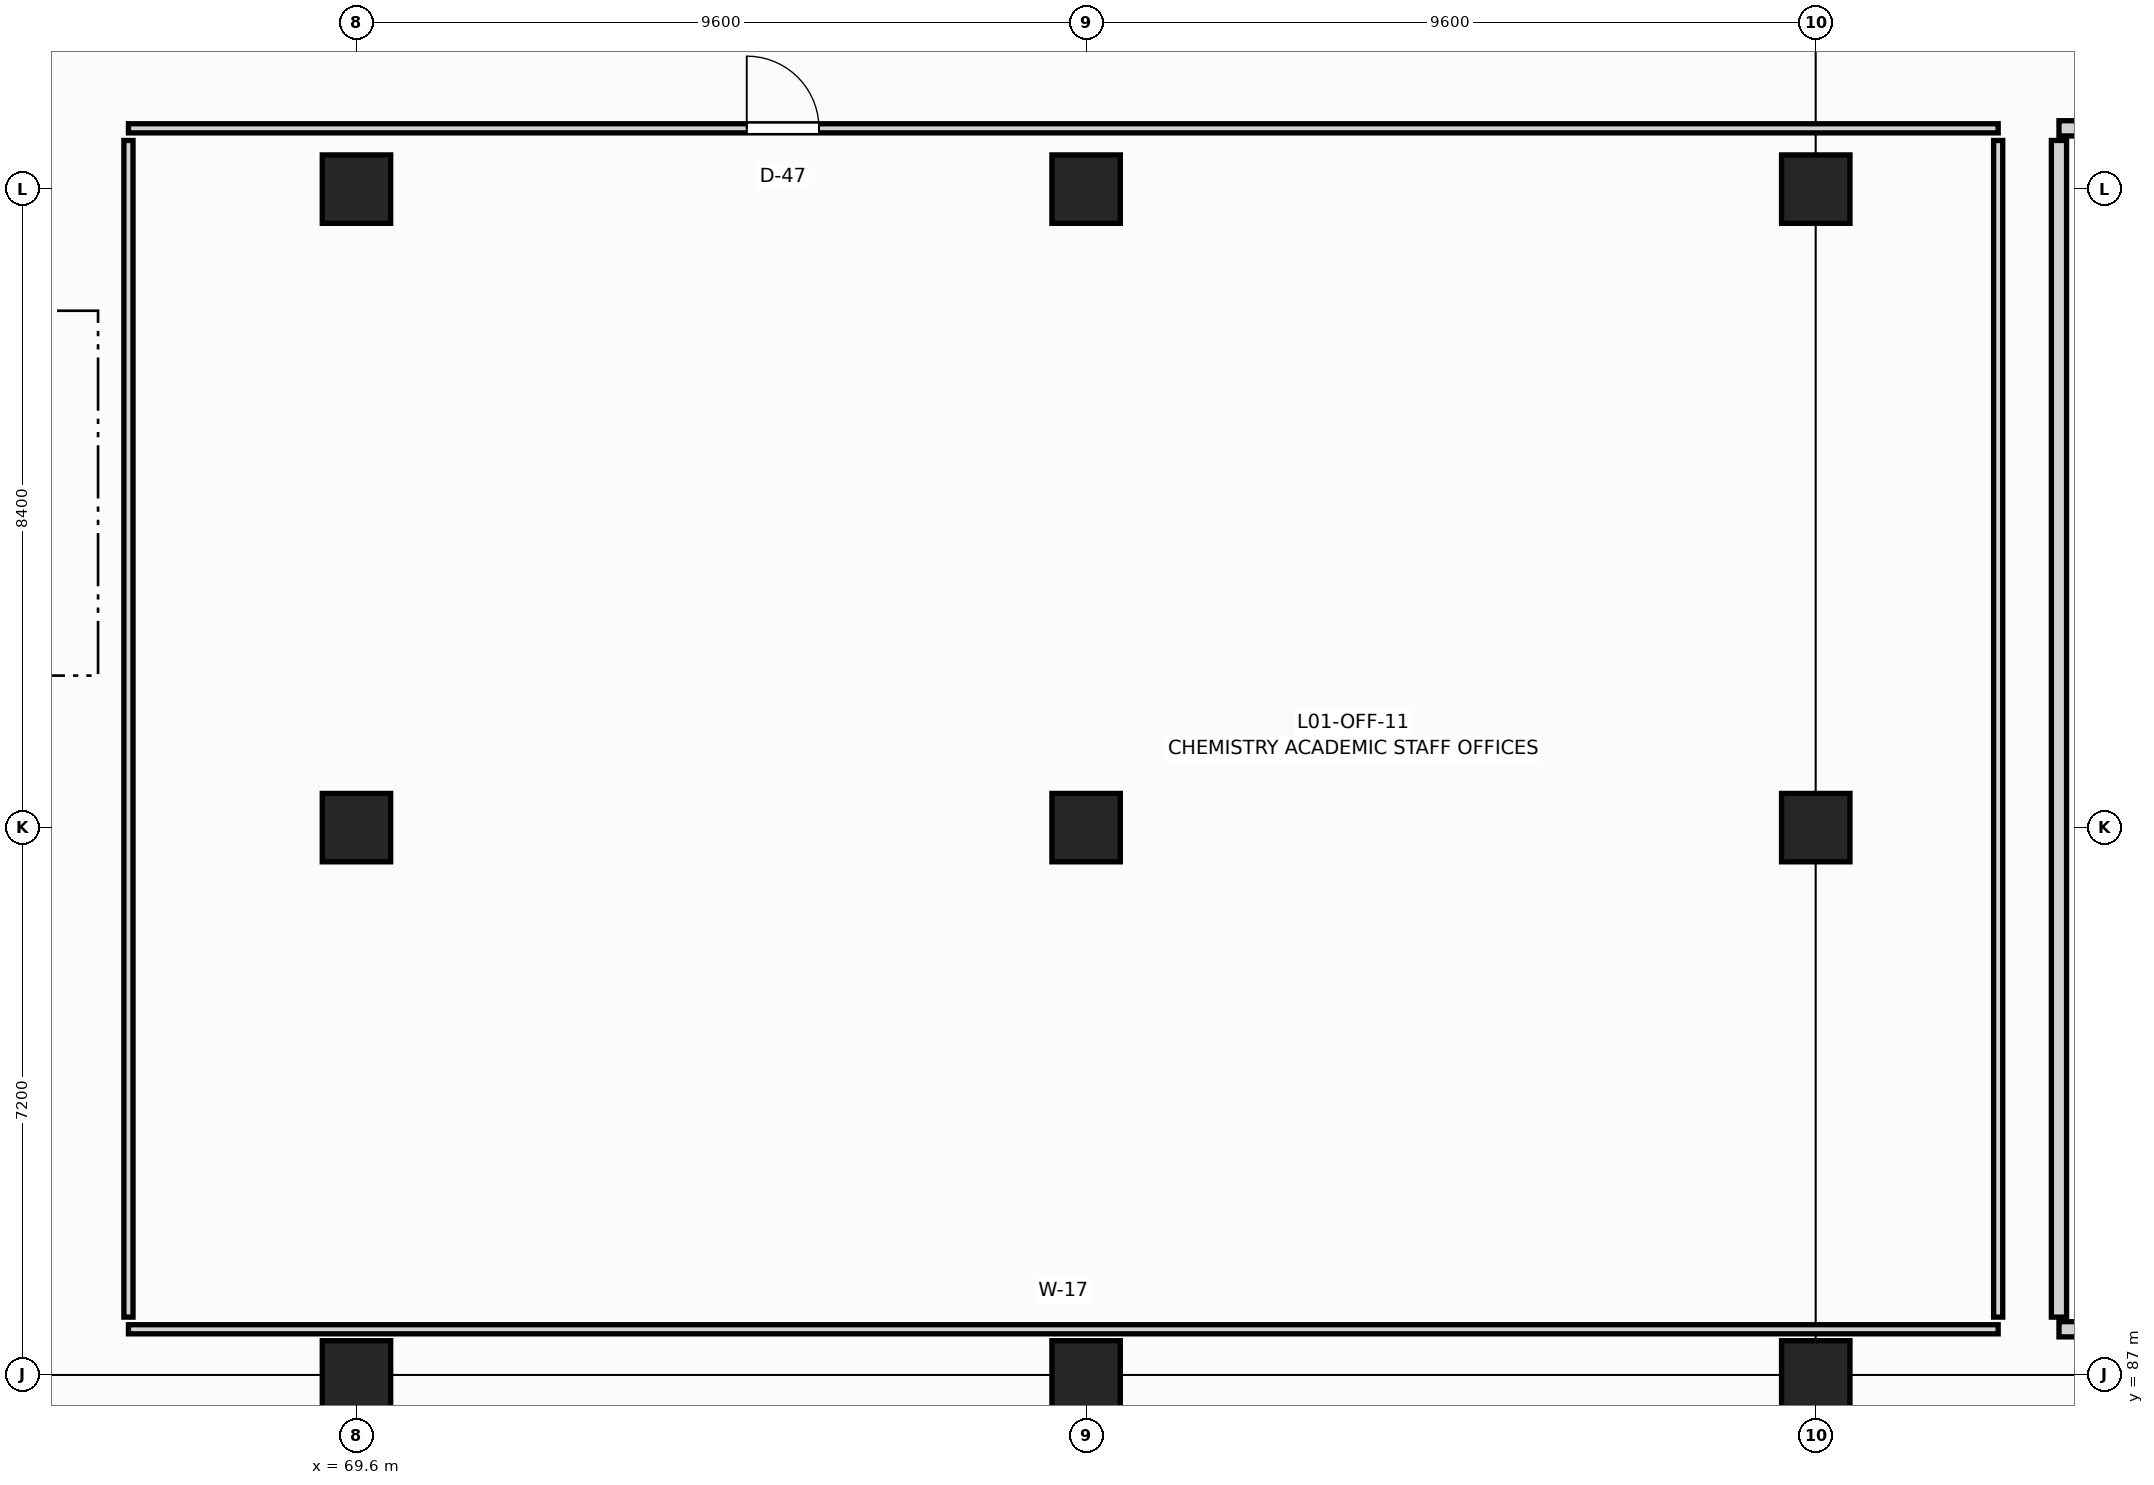
"""IFC4 building model, lengths in metres.
Left out: names, types, materials, properties, quantities, classifications, styles, units other than length and angle.
Written with IfcOpenShell. Run it as: python <this file> out.ifc"""

import sys

from ifc_helpers import new_model, si_unit, direction, frame, frame_2d, origin, origin_2d, place, context, subcontext, project, spatial, rectangle, extrude, element, fill, save


model = new_model("IFC4")
c1 = context("Model", 3, precision=1e-05, world=origin(), true_north=direction((0.0, 1.0)))
c2 = subcontext(c1, "Body", "Model", "MODEL_VIEW")
j1 = project(units=[si_unit("LENGTHUNIT", "METRE"), si_unit("PLANEANGLEUNIT", "RADIAN")], contexts=[c1])
p1 = place(None, origin())
s1 = spatial("IfcSite", under=j1, at=p1, CompositionType="ELEMENT")
p2 = place(p1, origin())
s2 = spatial("IfcBuilding", under=s1, at=p2, CompositionType="ELEMENT")
p3 = place(p2, frame((0.0, 0.0, 5.4)))
s3 = spatial("IfcBuildingStorey", under=s2, at=p3, CompositionType="ELEMENT", Elevation=5.4)
for number, where, z_axis, x_axis in (
    (1, (69.6, 87.0, 0.0), (0.0, 0.0, 1.0), (1.0, 0.0, 0.0)),
    (2, (69.6, 94.2, 0.0), (0.0, 0.0, 1.0), (1.0, 0.0, 0.0)),
    (3, (69.6, 102.6, 0.0), (0.0, 0.0, 1.0), (1.0, 0.0, 0.0)),
    (4, (79.2, 87.0, 0.0), (0.0, 0.0, 1.0), (1.0, 0.0, 0.0)),
    (5, (79.2, 94.2, 0.0), (0.0, 0.0, 1.0), (1.0, 0.0, 0.0)),
    (6, (79.2, 102.6, 0.0), (0.0, 0.0, 1.0), (1.0, 0.0, 0.0)),
    (7, (88.8, 87.0, 0.0), (0.0, 0.0, 1.0), (1.0, 0.0, 0.0)),
    (8, (88.8, 94.2, 0.0), (0.0, 0.0, 1.0), (1.0, 0.0, 0.0)),
    (9, (88.8, 102.6, 0.0), (0.0, 0.0, 1.0), (1.0, 0.0, 0.0)),
):
    element("IfcColumn", number, at=place(p3, frame(where, z_axis=z_axis, x_axis=x_axis)), inside=s3, PredefinedType="COLUMN", context=c2, shape_type="SweptSolid", body=[
        extrude(rectangle(XDim=0.9, YDim=0.9, at=origin_2d()), origin(), (0.0, 0.0, 1.0), 4.18),
    ])
p4 = place(p3, frame((66.6, 87.6, 0.0), z_axis=(0.0, 0.0, 1.0), x_axis=(1.0, 0.0, 0.0)))
e10 = element("IfcWall", 10, at=p4, inside=s3, PredefinedType="PARTITIONING", context=c2, shape_type="SweptSolid", body=[
    extrude(rectangle(XDim=24.6, YDim=0.12, at=frame_2d((12.3, 0.0))), origin(), (0.0, 0.0, 1.0), 3.22),
])
p5 = place(p3, frame((66.6, 103.4, 0.0), z_axis=(0.0, 0.0, 1.0), x_axis=(1.0, 0.0, 0.0)))
e11 = element("IfcWall", 11, at=p5, inside=s3, PredefinedType="PARTITIONING", context=c2, shape_type="SweptSolid", body=[
    extrude(rectangle(XDim=24.6, YDim=0.12, at=frame_2d((12.3, 0.0))), origin(), (0.0, 0.0, 1.0), 3.22),
])
p6 = place(p5, frame((8.135, 0.0, 0.0)))
e12 = element("IfcOpeningElement", 12, at=p6, cuts=e11, PredefinedType="OPENING", context=c2, shape_type="SweptSolid", body=[
    extrude(rectangle(XDim=0.95, YDim=2.15, at=frame_2d((0.475, 1.075))), frame((0.0, 0.07, 0.0), z_axis=(0.0, -1.0, 0.0), x_axis=(1.0, 0.0, 0.0)), (0.0, 0.0, 1.0), 0.14),
])
for number, where, z_axis, x_axis in (
    (13, (66.6, 87.76, 0.0), (0.0, 0.0, 1.0), (0.0, 1.0, 0.0)),
    (14, (91.2, 87.76, 0.0), (0.0, 0.0, 1.0), (0.0, 1.0, 0.0)),
):
    element("IfcWall", number, at=place(p3, frame(where, z_axis=z_axis, x_axis=x_axis)), inside=s3, PredefinedType="PARTITIONING", context=c2, shape_type="SweptSolid", body=[
        extrude(rectangle(XDim=15.48, YDim=0.12, at=frame_2d((7.74, 0.0))), origin(), (0.0, 0.0, 1.0), 3.22),
    ])
p7 = place(p3, frame((92.0, 87.6, 0.0), z_axis=(0.0, 0.0, 1.0), x_axis=(1.0, 0.0, 0.0)))
e15 = element("IfcWall", 15, at=p7, inside=s3, PredefinedType="PARTITIONING", context=c2, shape_type="SweptSolid", body=[
    extrude(rectangle(XDim=24.8, YDim=0.2, at=frame_2d((12.4, 0.0))), origin(), (0.0, 0.0, 1.0), 3.22),
])
p8 = place(p3, frame((92.0, 103.4, 0.0), z_axis=(0.0, 0.0, 1.0), x_axis=(1.0, 0.0, 0.0)))
e16 = element("IfcWall", 16, at=p8, inside=s3, PredefinedType="PARTITIONING", context=c2, shape_type="SweptSolid", body=[
    extrude(rectangle(XDim=24.8, YDim=0.2, at=frame_2d((12.4, 0.0))), origin(), (0.0, 0.0, 1.0), 3.22),
])
p9 = place(p8, frame((11.65, 0.0, 0.0)))
e17 = element("IfcOpeningElement", 17, at=p9, cuts=e16, PredefinedType="OPENING", context=c2, shape_type="SweptSolid", body=[
    extrude(rectangle(XDim=1.5, YDim=2.2, at=frame_2d((0.75, 1.1))), frame((0.0, 0.11, 0.0), z_axis=(0.0, -1.0, 0.0), x_axis=(1.0, 0.0, 0.0)), (0.0, 0.0, 1.0), 0.22),
])
p10 = place(p3, frame((92.0, 87.76, 0.0), z_axis=(0.0, 0.0, 1.0), x_axis=(0.0, 1.0, 0.0)))
e18 = element("IfcWall", 18, at=p10, inside=s3, PredefinedType="PARTITIONING", context=c2, shape_type="SweptSolid", body=[
    extrude(rectangle(XDim=15.48, YDim=0.2, at=frame_2d((7.74, 0.0))), origin(), (0.0, 0.0, 1.0), 3.22),
])
p11 = place(p6, origin())
e19 = element("IfcDoor", 19, at=p11, inside=s3, OperationType="SINGLE_SWING_LEFT", PredefinedType="DOOR", context=c2, shape_type="SweptSolid", body=[
    extrude(rectangle(XDim=0.95, YDim=2.15, at=frame_2d((0.475, 1.075))), frame((0.0, 0.025, 0.0), z_axis=(0.0, -1.0, 0.0), x_axis=(1.0, 0.0, 0.0)), (0.0, 0.0, 1.0), 0.05),
])
fill(e12, e19)
save(model, sys.argv[1])
